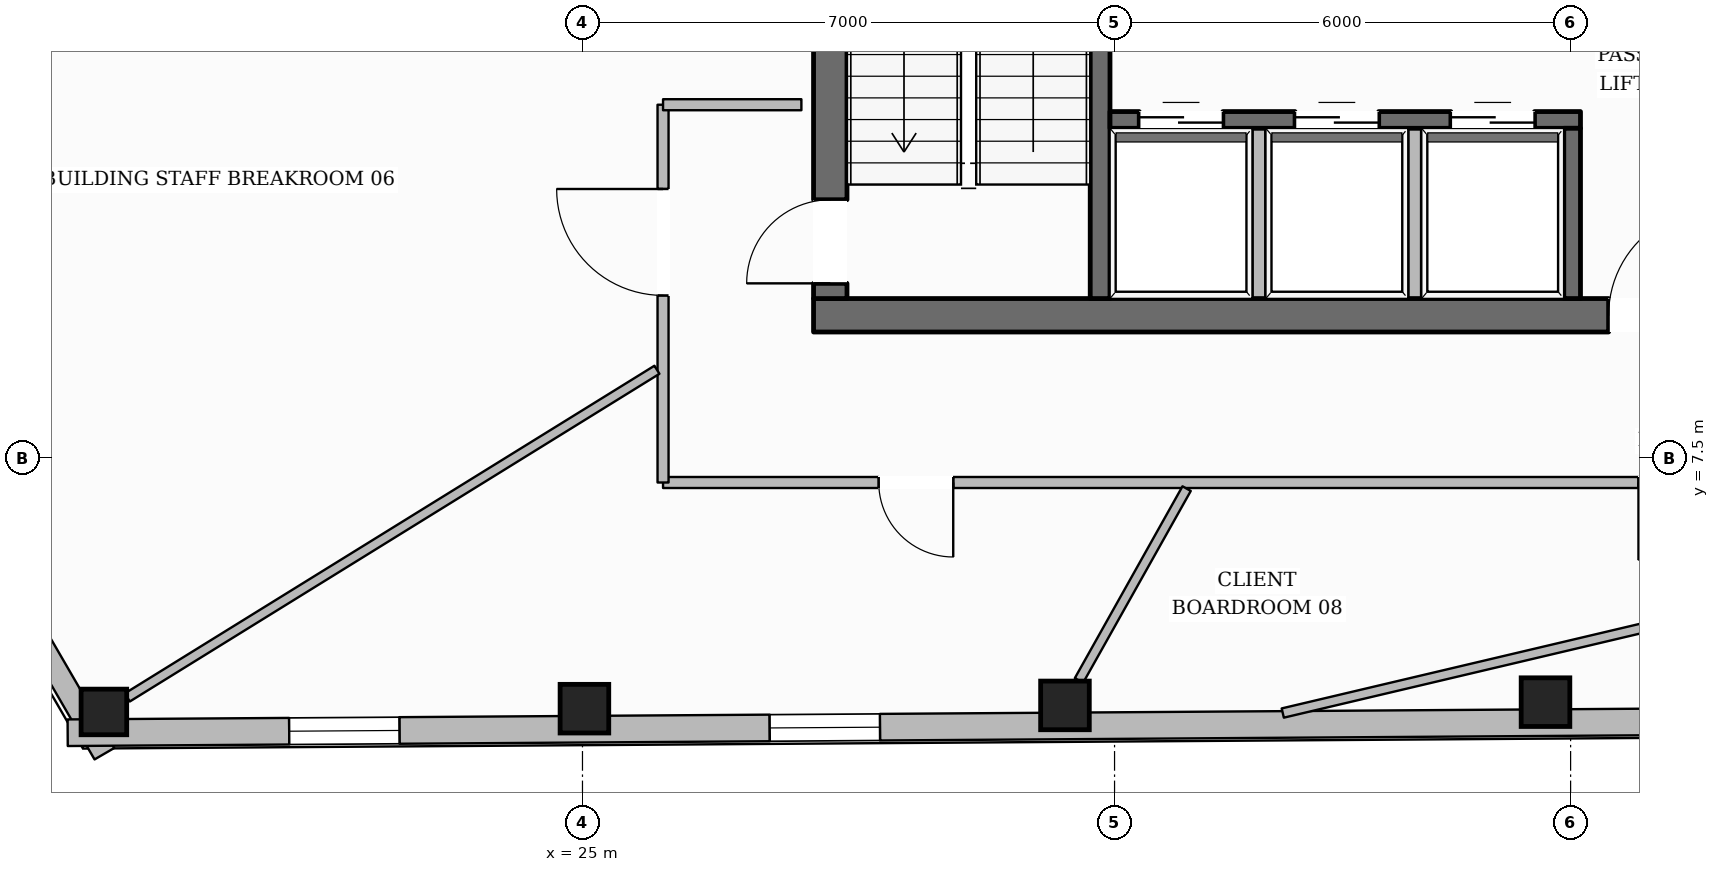
"""IFC4 building model, lengths in metres.
Left out: names, types, materials, properties, quantities, classifications, styles, units other than length and angle.
Written with IfcOpenShell. Run it as: python <this file> out.ifc"""

import sys

from ifc_helpers import new_model, si_unit, direction, frame, frame_2d, origin, origin_2d, place, context, subcontext, project, spatial, rectangle, hollow_rectangle, extrude, element, fill, save


model = new_model("IFC4")
c1 = context("Model", 3, precision=1e-05, world=origin(), true_north=direction((0.0, 1.0)))
c2 = subcontext(c1, "Body", "Model", "MODEL_VIEW")
j1 = project(units=[si_unit("LENGTHUNIT", "METRE"), si_unit("PLANEANGLEUNIT", "RADIAN")], contexts=[c1])
p1 = place(None, origin())
s1 = spatial("IfcSite", under=j1, at=p1, CompositionType="ELEMENT")
p2 = place(p1, origin())
s2 = spatial("IfcBuilding", under=s1, at=p2, CompositionType="ELEMENT")
p3 = place(p2, frame((0.0, 0.0, 211.2)))
s3 = spatial("IfcBuildingStorey", under=s2, at=p3, CompositionType="ELEMENT", Elevation=211.2)
p4 = place(p3, frame((28.04, 9.38, 0.0), z_axis=(0.0, 0.0, 1.0), x_axis=(1.0, 0.0, 0.0)))
e1 = element("IfcWall", 1, at=p4, inside=s3, PredefinedType="SOLIDWALL", context=c2, shape_type="SweptSolid", body=[
    extrude(rectangle(XDim=19.92, YDim=0.44, at=frame_2d((9.96, 0.0))), origin(), (0.0, 0.0, 1.0), 3.6),
])
p5 = place(p4, frame((10.46, 0.0, 0.0)))
e2 = element("IfcOpeningElement", 2, at=p5, cuts=e1, PredefinedType="OPENING", context=c2, shape_type="SweptSolid", body=[
    extrude(rectangle(XDim=1.4, YDim=2.2, at=frame_2d((0.7, 1.1))), frame((0.0, 0.23, 0.0), z_axis=(0.0, -1.0, 0.0), x_axis=(1.0, 0.0, 0.0)), (0.0, 0.0, 1.0), 0.46),
])
p6 = place(p3, frame((28.26, 9.6, 0.0), z_axis=(0.0, 0.0, 1.0), x_axis=(0.0, 1.0, 0.0)))
e3 = element("IfcWall", 3, at=p6, inside=s3, PredefinedType="SOLIDWALL", context=c2, shape_type="SweptSolid", body=[
    extrude(rectangle(XDim=13.0, YDim=0.44, at=frame_2d((6.5, 0.0))), origin(), (0.0, 0.0, 1.0), 3.6),
])
p7 = place(p6, frame((0.2, 0.0, 0.0)))
e4 = element("IfcOpeningElement", 4, at=p7, cuts=e3, PredefinedType="OPENING", context=c2, shape_type="SweptSolid", body=[
    extrude(rectangle(XDim=1.1, YDim=2.15, at=frame_2d((0.55, 1.075))), frame((0.0, 0.23, 0.0), z_axis=(0.0, -1.0, 0.0), x_axis=(1.0, 0.0, 0.0)), (0.0, 0.0, 1.0), 0.46),
])
p8 = place(p6, frame((8.4, 0.0, 0.0)))
e5 = element("IfcOpeningElement", 5, at=p8, cuts=e3, PredefinedType="OPENING", context=c2, shape_type="SweptSolid", body=[
    extrude(rectangle(XDim=0.9, YDim=2.1, at=frame_2d((0.45, 1.05))), frame((0.0, 0.23, 0.0), z_axis=(0.0, -1.0, 0.0), x_axis=(1.0, 0.0, 0.0)), (0.0, 0.0, 1.0), 0.46),
])
p9 = place(p3, frame((31.81, 9.6, 0.0), z_axis=(0.0, 0.0, 1.0), x_axis=(0.0, 1.0, 0.0)))
e6 = element("IfcWall", 6, at=p9, inside=s3, PredefinedType="SHEAR", context=c2, shape_type="SweptSolid", body=[
    extrude(rectangle(XDim=13.0, YDim=0.26, at=frame_2d((6.5, 0.0))), origin(), (0.0, 0.0, 1.0), 3.6),
])
p10 = place(p9, frame((10.925, 0.0, 0.0)))
e7 = element("IfcOpeningElement", 7, at=p10, cuts=e6, PredefinedType="OPENING", context=c2, shape_type="SweptSolid", body=[
    extrude(rectangle(XDim=1.25, YDim=2.25, at=frame_2d((0.625, 1.125))), frame((0.0, 0.14, 0.0), z_axis=(0.0, -1.0, 0.0), x_axis=(1.0, 0.0, 0.0)), (0.0, 0.0, 1.0), 0.28),
])
p11 = place(p3, frame((31.94, 11.95, 0.0), z_axis=(0.0, 0.0, 1.0), x_axis=(1.0, 0.0, 0.0)))
e8 = element("IfcWall", 8, at=p11, inside=s3, PredefinedType="SOLIDWALL", context=c2, shape_type="SweptSolid", body=[
    extrude(rectangle(XDim=6.19, YDim=0.22, at=frame_2d((3.095, 0.0))), origin(), (0.0, 0.0, 1.0), 3.6),
])
p12 = place(p11, frame((0.385, 0.0, 0.0)))
e9 = element("IfcOpeningElement", 9, at=p12, cuts=e8, PredefinedType="OPENING", context=c2, shape_type="SweptSolid", body=[
    extrude(rectangle(XDim=1.1, YDim=2.2, at=frame_2d((0.55, 1.1))), frame((0.0, 0.12, 0.0), z_axis=(0.0, -1.0, 0.0), x_axis=(1.0, 0.0, 0.0)), (0.0, 0.0, 1.0), 0.24),
])
p13 = place(p11, frame((2.435, 0.0, 0.0)))
e10 = element("IfcOpeningElement", 10, at=p13, cuts=e8, PredefinedType="OPENING", context=c2, shape_type="SweptSolid", body=[
    extrude(rectangle(XDim=1.1, YDim=2.2, at=frame_2d((0.55, 1.1))), frame((0.0, 0.12, 0.0), z_axis=(0.0, -1.0, 0.0), x_axis=(1.0, 0.0, 0.0)), (0.0, 0.0, 1.0), 0.24),
])
p14 = place(p11, frame((4.485, 0.0, 0.0)))
e11 = element("IfcOpeningElement", 11, at=p14, cuts=e8, PredefinedType="OPENING", context=c2, shape_type="SweptSolid", body=[
    extrude(rectangle(XDim=1.1, YDim=2.2, at=frame_2d((0.55, 1.1))), frame((0.0, 0.12, 0.0), z_axis=(0.0, -1.0, 0.0), x_axis=(1.0, 0.0, 0.0)), (0.0, 0.0, 1.0), 0.24),
])
p15 = place(p3, frame((38.02, 9.6, 0.0), z_axis=(0.0, 0.0, 1.0), x_axis=(0.0, 1.0, 0.0)))
e12 = element("IfcWall", 12, at=p15, inside=s3, PredefinedType="SOLIDWALL", context=c2, shape_type="SweptSolid", body=[
    extrude(rectangle(XDim=2.24, YDim=0.22, at=frame_2d((1.12, 0.0))), origin(), (0.0, 0.0, 1.0), 3.6),
])
p16 = place(p3, frame((18.704, 4.162, 0.0), z_axis=(0.0, 0.0, 1.0), x_axis=(1.0, 0.0, 0.0)))
e13 = element("IfcColumn", 13, at=p16, inside=s3, PredefinedType="COLUMN", context=c2, shape_type="SweptSolid", body=[
    extrude(hollow_rectangle(XDim=0.6, YDim=0.6, WallThickness=0.028, at=origin_2d()), origin(), (0.0, 0.0, 1.0), 3.6),
])
for number, where, z_axis, x_axis in (
    (14, (25.026, 4.205, 0.0), (0.0, 0.0, 1.0), (1.0, 0.0, 0.0)),
    (15, (31.348, 4.248, 0.0), (0.0, 0.0, 1.0), (1.0, 0.0, 0.0)),
    (16, (37.67, 4.29, 0.0), (0.0, 0.0, 1.0), (1.0, 0.0, 0.0)),
):
    element("IfcColumn", number, at=place(p3, frame(where, z_axis=z_axis, x_axis=x_axis)), inside=s3, PredefinedType="COLUMN", context=c2, shape_type="SweptSolid", body=[
        extrude(hollow_rectangle(XDim=0.64, YDim=0.64, WallThickness=0.028, at=origin_2d()), origin(), (0.0, 0.0, 1.0), 3.6),
    ])
p17 = place(p3, frame((14.16, 10.888, 0.0), z_axis=(0.0, 0.0, 1.0), x_axis=(0.508058913236, 0.861322321017, 0.0)))
e17 = element("IfcWall", 17, at=p17, inside=s3, PredefinedType="STANDARD", context=c2, shape_type="SweptSolid", body=[
    extrude(rectangle(XDim=38.718, YDim=0.35, at=frame_2d((19.359, 0.0))), origin(), (0.0, 0.0, 1.0), 3.132),
])
p18 = place(p17, frame((34.374, 0.0, 0.65)))
e18 = element("IfcOpeningElement", 18, at=p18, cuts=e17, PredefinedType="OPENING", context=c2, shape_type="SweptSolid", body=[
    extrude(rectangle(XDim=1.45, YDim=1.75, at=frame_2d((0.725, 0.875))), frame((0.0, 0.185, 0.0), z_axis=(0.0, -1.0, 0.0), x_axis=(1.0, 0.0, 0.0)), (0.0, 0.0, 1.0), 0.37),
])
p19 = place(p17, frame((28.08, 0.0, 0.65)))
e19 = element("IfcOpeningElement", 19, at=p19, cuts=e17, PredefinedType="OPENING", context=c2, shape_type="SweptSolid", body=[
    extrude(rectangle(XDim=1.45, YDim=1.75, at=frame_2d((0.725, 0.875))), frame((0.0, 0.185, 0.0), z_axis=(0.0, -1.0, 0.0), x_axis=(1.0, 0.0, 0.0)), (0.0, 0.0, 1.0), 0.37),
])
p20 = place(p17, frame((15.491, 0.0, 0.65)))
e20 = element("IfcOpeningElement", 20, at=p20, cuts=e17, PredefinedType="OPENING", context=c2, shape_type="SweptSolid", body=[
    extrude(rectangle(XDim=1.45, YDim=1.75, at=frame_2d((0.725, 0.875))), frame((0.0, 0.185, 0.0), z_axis=(0.0, -1.0, 0.0), x_axis=(1.0, 0.0, 0.0)), (0.0, 0.0, 1.0), 0.37),
])
p21 = place(p17, frame((9.197, 0.0, 0.65)))
e21 = element("IfcOpeningElement", 21, at=p21, cuts=e17, PredefinedType="OPENING", context=c2, shape_type="SweptSolid", body=[
    extrude(rectangle(XDim=1.45, YDim=1.75, at=frame_2d((0.725, 0.875))), frame((0.0, 0.185, 0.0), z_axis=(0.0, -1.0, 0.0), x_axis=(1.0, 0.0, 0.0)), (0.0, 0.0, 1.0), 0.37),
])
p22 = place(p17, frame((2.903, 0.0, 0.65)))
e22 = element("IfcOpeningElement", 22, at=p22, cuts=e17, PredefinedType="OPENING", context=c2, shape_type="SweptSolid", body=[
    extrude(rectangle(XDim=1.45, YDim=1.75, at=frame_2d((0.725, 0.875))), frame((0.0, 0.185, 0.0), z_axis=(0.0, -1.0, 0.0), x_axis=(1.0, 0.0, 0.0)), (0.0, 0.0, 1.0), 0.37),
])
p23 = place(p3, frame((18.71, 3.612, 0.0), z_axis=(0.0, 0.0, 1.0), x_axis=(-0.502175829977, 0.864765538043, 0.0)))
e23 = element("IfcWall", 23, at=p23, inside=s3, PredefinedType="STANDARD", context=c2, shape_type="SweptSolid", body=[
    extrude(rectangle(XDim=9.058, YDim=0.3, at=frame_2d((4.529, 0.0))), origin(), (0.0, 0.0, 1.0), 3.132),
])
p24 = place(p23, frame((4.004, 0.0, 0.65)))
e24 = element("IfcOpeningElement", 24, at=p24, cuts=e23, PredefinedType="OPENING", context=c2, shape_type="SweptSolid", body=[
    extrude(rectangle(XDim=1.05, YDim=1.7, at=frame_2d((0.525, 0.85))), frame((0.0, 0.16, 0.0), z_axis=(0.0, -1.0, 0.0), x_axis=(1.0, 0.0, 0.0)), (0.0, 0.0, 1.0), 0.32),
])
p25 = place(p3, frame((57.109, 4.153, 0.0), z_axis=(0.0, 0.0, 1.0), x_axis=(-0.999976880016, -0.006799958314, 0.0)))
e25 = element("IfcWall", 25, at=p25, inside=s3, PredefinedType="STANDARD", context=c2, shape_type="SweptSolid", body=[
    extrude(rectangle(XDim=38.883, YDim=0.35, at=frame_2d((19.442, 0.0))), origin(), (0.0, 0.0, 1.0), 3.132),
])
p26 = place(p25, frame((34.519, 0.0, 0.65)))
e26 = element("IfcOpeningElement", 26, at=p26, cuts=e25, PredefinedType="OPENING", context=c2, shape_type="SweptSolid", body=[
    extrude(rectangle(XDim=1.45, YDim=1.75, at=frame_2d((0.725, 0.875))), frame((0.0, 0.185, 0.0), z_axis=(0.0, -1.0, 0.0), x_axis=(1.0, 0.0, 0.0)), (0.0, 0.0, 1.0), 0.37),
])
p27 = place(p25, frame((28.197, 0.0, 0.65)))
e27 = element("IfcOpeningElement", 27, at=p27, cuts=e25, PredefinedType="OPENING", context=c2, shape_type="SweptSolid", body=[
    extrude(rectangle(XDim=1.45, YDim=1.75, at=frame_2d((0.725, 0.875))), frame((0.0, 0.185, 0.0), z_axis=(0.0, -1.0, 0.0), x_axis=(1.0, 0.0, 0.0)), (0.0, 0.0, 1.0), 0.37),
])
p28 = place(p25, frame((15.552, 0.0, 0.65)))
e28 = element("IfcOpeningElement", 28, at=p28, cuts=e25, PredefinedType="OPENING", context=c2, shape_type="SweptSolid", body=[
    extrude(rectangle(XDim=1.45, YDim=1.75, at=frame_2d((0.725, 0.875))), frame((0.0, 0.185, 0.0), z_axis=(0.0, -1.0, 0.0), x_axis=(1.0, 0.0, 0.0)), (0.0, 0.0, 1.0), 0.37),
])
p29 = place(p25, frame((9.23, 0.0, 0.65)))
e29 = element("IfcOpeningElement", 29, at=p29, cuts=e25, PredefinedType="OPENING", context=c2, shape_type="SweptSolid", body=[
    extrude(rectangle(XDim=1.45, YDim=1.75, at=frame_2d((0.725, 0.875))), frame((0.0, 0.185, 0.0), z_axis=(0.0, -1.0, 0.0), x_axis=(1.0, 0.0, 0.0)), (0.0, 0.0, 1.0), 0.37),
])
p30 = place(p25, frame((2.908, 0.0, 0.65)))
e30 = element("IfcOpeningElement", 30, at=p30, cuts=e25, PredefinedType="OPENING", context=c2, shape_type="SweptSolid", body=[
    extrude(rectangle(XDim=1.45, YDim=1.75, at=frame_2d((0.725, 0.875))), frame((0.0, 0.185, 0.0), z_axis=(0.0, -1.0, 0.0), x_axis=(1.0, 0.0, 0.0)), (0.0, 0.0, 1.0), 0.37),
])
for number, where, z_axis, x_axis in (
    (31, (33.9, 9.52, 0.0), (0.0, 0.0, 1.0), (0.0, 1.0, 0.0)),
    (32, (35.95, 9.52, 0.0), (0.0, 0.0, 1.0), (0.0, 1.0, 0.0)),
):
    element("IfcWall", number, at=place(p3, frame(where, z_axis=z_axis, x_axis=x_axis)), inside=s3, PredefinedType="PARTITIONING", context=c2, shape_type="SweptSolid", body=[
        extrude(rectangle(XDim=2.32, YDim=0.165, at=frame_2d((1.16, 0.0))), origin(), (0.0, 0.0, 1.0), 3.6),
    ])
p31 = place(p3, frame((49.94, 7.18, 0.0), z_axis=(0.0, 0.0, 1.0), x_axis=(-1.0, 0.0, 0.0)))
e33 = element("IfcWall", 33, at=p31, inside=s3, PredefinedType="PARTITIONING", context=c2, shape_type="SweptSolid", body=[
    extrude(rectangle(XDim=23.88, YDim=0.145, at=frame_2d((11.94, 0.0))), origin(), (0.0, 0.0, 1.0), 3.6),
])
p32 = place(p31, frame((20.062, 0.0, 0.0)))
e34 = element("IfcOpeningElement", 34, at=p32, cuts=e33, PredefinedType="OPENING", context=c2, shape_type="SweptSolid", body=[
    extrude(rectangle(XDim=0.98, YDim=2.15, at=frame_2d((0.49, 1.075))), frame((0.0, 0.083, 0.0), z_axis=(0.0, -1.0, 0.0), x_axis=(1.0, 0.0, 0.0)), (0.0, 0.0, 1.0), 0.165),
])
p33 = place(p31, frame((10.027, 0.0, 0.0)))
e35 = element("IfcOpeningElement", 35, at=p33, cuts=e33, PredefinedType="OPENING", context=c2, shape_type="SweptSolid", body=[
    extrude(rectangle(XDim=1.02, YDim=2.15, at=frame_2d((0.51, 1.075))), frame((0.0, 0.083, 0.0), z_axis=(0.0, -1.0, 0.0), x_axis=(1.0, 0.0, 0.0)), (0.0, 0.0, 1.0), 0.165),
])
p34 = place(p3, frame((26.06, 7.18, 0.0), z_axis=(0.0, 0.0, 1.0), x_axis=(0.0, 1.0, 0.0)))
e36 = element("IfcWall", 36, at=p34, inside=s3, PredefinedType="PARTITIONING", context=c2, shape_type="SweptSolid", body=[
    extrude(rectangle(XDim=4.97, YDim=0.145, at=frame_2d((2.485, 0.0))), origin(), (0.0, 0.0, 1.0), 3.6),
])
p35 = place(p34, frame((2.461, 0.0, 0.0)))
e37 = element("IfcOpeningElement", 37, at=p35, cuts=e36, PredefinedType="OPENING", context=c2, shape_type="SweptSolid", body=[
    extrude(rectangle(XDim=1.4, YDim=2.2, at=frame_2d((0.7, 1.1))), frame((0.0, 0.083, 0.0), z_axis=(0.0, -1.0, 0.0), x_axis=(1.0, 0.0, 0.0)), (0.0, 0.0, 1.0), 0.165),
])
p36 = place(p3, frame((26.06, 12.15, 0.0), z_axis=(0.0, 0.0, 1.0), x_axis=(1.0, 0.0, 0.0)))
e38 = element("IfcWall", 38, at=p36, inside=s3, PredefinedType="PARTITIONING", context=c2, shape_type="SweptSolid", body=[
    extrude(rectangle(XDim=1.82, YDim=0.145, at=frame_2d((0.91, 0.0))), origin(), (0.0, 0.0, 1.0), 3.6),
])
p37 = place(p3, frame((25.979, 8.663, 0.0), z_axis=(0.0, 0.0, 1.0), x_axis=(-0.850393393123, -0.526147390882, 0.0)))
e39 = element("IfcWall", 39, at=p37, inside=s3, PredefinedType="PARTITIONING", context=c2, shape_type="SweptSolid", body=[
    extrude(rectangle(XDim=8.194, YDim=0.125, at=frame_2d((4.097, 0.0))), origin(), (0.0, 0.0, 1.0), 3.141),
])
p38 = place(p3, frame((32.948, 7.1, 0.0), z_axis=(0.0, 0.0, 1.0), x_axis=(-0.489448120608, -0.872032417536, 0.0)))
e40 = element("IfcWall", 40, at=p38, inside=s3, PredefinedType="PARTITIONING", context=c2, shape_type="SweptSolid", body=[
    extrude(rectangle(XDim=2.895, YDim=0.125, at=frame_2d((1.447, 0.0))), origin(), (0.0, 0.0, 1.0), 3.6),
])
p39 = place(p3, frame((34.213, 4.147, 0.0), z_axis=(0.0, 0.0, 1.0), x_axis=(0.973225904265, 0.229850689075, 0.0)))
e41 = element("IfcWall", 41, at=p39, inside=s3, PredefinedType="PARTITIONING", context=c2, shape_type="SweptSolid", body=[
    extrude(rectangle(XDim=12.846, YDim=0.125, at=frame_2d((6.423, 0.0))), origin(), (0.0, 0.0, 1.0), 3.135),
])
p40 = place(p39, frame((5.984, 0.0, 0.0)))
e42 = element("IfcOpeningElement", 42, at=p40, cuts=e41, PredefinedType="OPENING", context=c2, shape_type="SweptSolid", body=[
    extrude(rectangle(XDim=0.98, YDim=2.15, at=frame_2d((0.49, 1.075))), frame((0.0, 0.073, 0.0), z_axis=(0.0, -1.0, 0.0), x_axis=(1.0, 0.0, 0.0)), (0.0, 0.0, 1.0), 0.145),
])
p41 = place(p26, origin())
e43 = element("IfcWindow", 43, at=p41, inside=s3, PartitioningType="SINGLE_PANEL", PredefinedType="WINDOW", context=c2, shape_type="SweptSolid", body=[
    extrude(rectangle(XDim=1.45, YDim=1.75, at=frame_2d((0.725, 0.875))), frame((0.0, 0.03, 0.0), z_axis=(0.0, -1.0, 0.0), x_axis=(1.0, 0.0, 0.0)), (0.0, 0.0, 1.0), 0.06),
])
fill(e26, e43)
p42 = place(p27, origin())
e44 = element("IfcWindow", 44, at=p42, inside=s3, PartitioningType="SINGLE_PANEL", PredefinedType="WINDOW", context=c2, shape_type="SweptSolid", body=[
    extrude(rectangle(XDim=1.45, YDim=1.75, at=frame_2d((0.725, 0.875))), frame((0.0, 0.03, 0.0), z_axis=(0.0, -1.0, 0.0), x_axis=(1.0, 0.0, 0.0)), (0.0, 0.0, 1.0), 0.06),
])
fill(e27, e44)
p43 = place(p7, origin())
e45 = element("IfcDoor", 45, at=p43, inside=s3, OperationType="SINGLE_SWING_LEFT", PredefinedType="DOOR", context=c2, shape_type="SweptSolid", body=[
    extrude(rectangle(XDim=1.1, YDim=2.15, at=frame_2d((0.55, 1.075))), frame((0.0, 0.025, 0.0), z_axis=(0.0, -1.0, 0.0), x_axis=(1.0, 0.0, 0.0)), (0.0, 0.0, 1.0), 0.05),
])
fill(e4, e45)
p44 = place(p5, origin())
e46 = element("IfcDoor", 46, at=p44, inside=s3, OperationType="SINGLE_SWING_RIGHT", PredefinedType="DOOR", context=c2, shape_type="SweptSolid", body=[
    extrude(rectangle(XDim=1.4, YDim=2.2, at=frame_2d((0.7, 1.1))), frame((0.0, 0.025, 0.0), z_axis=(0.0, -1.0, 0.0), x_axis=(1.0, 0.0, 0.0)), (0.0, 0.0, 1.0), 0.05),
])
fill(e2, e46)
p45 = place(p12, origin())
e47 = element("IfcDoor", 47, at=p45, inside=s3, OperationType="DOUBLE_DOOR_SLIDING", PredefinedType="DOOR", context=c2, shape_type="SweptSolid", body=[
    extrude(rectangle(XDim=1.1, YDim=2.2, at=frame_2d((0.55, 1.1))), frame((0.0, 0.025, 0.0), z_axis=(0.0, -1.0, 0.0), x_axis=(1.0, 0.0, 0.0)), (0.0, 0.0, 1.0), 0.05),
])
fill(e9, e47)
p46 = place(p13, origin())
e48 = element("IfcDoor", 48, at=p46, inside=s3, OperationType="DOUBLE_DOOR_SLIDING", PredefinedType="DOOR", context=c2, shape_type="SweptSolid", body=[
    extrude(rectangle(XDim=1.1, YDim=2.2, at=frame_2d((0.55, 1.1))), frame((0.0, 0.025, 0.0), z_axis=(0.0, -1.0, 0.0), x_axis=(1.0, 0.0, 0.0)), (0.0, 0.0, 1.0), 0.05),
])
fill(e10, e48)
p47 = place(p14, origin())
e49 = element("IfcDoor", 49, at=p47, inside=s3, OperationType="DOUBLE_DOOR_SLIDING", PredefinedType="DOOR", context=c2, shape_type="SweptSolid", body=[
    extrude(rectangle(XDim=1.1, YDim=2.2, at=frame_2d((0.55, 1.1))), frame((0.0, 0.025, 0.0), z_axis=(0.0, -1.0, 0.0), x_axis=(1.0, 0.0, 0.0)), (0.0, 0.0, 1.0), 0.05),
])
fill(e11, e49)
p48 = place(p35, origin())
e50 = element("IfcDoor", 50, at=p48, inside=s3, OperationType="SINGLE_SWING_RIGHT", PredefinedType="DOOR", context=c2, shape_type="SweptSolid", body=[
    extrude(rectangle(XDim=1.4, YDim=2.2, at=frame_2d((0.7, 1.1))), frame((0.0, 0.025, 0.0), z_axis=(0.0, -1.0, 0.0), x_axis=(1.0, 0.0, 0.0)), (0.0, 0.0, 1.0), 0.05),
])
fill(e37, e50)
p49 = place(p32, origin())
e51 = element("IfcDoor", 51, at=p49, inside=s3, OperationType="SINGLE_SWING_LEFT", PredefinedType="DOOR", context=c2, shape_type="SweptSolid", body=[
    extrude(rectangle(XDim=0.98, YDim=2.15, at=frame_2d((0.49, 1.075))), frame((0.0, 0.025, 0.0), z_axis=(0.0, -1.0, 0.0), x_axis=(1.0, 0.0, 0.0)), (0.0, 0.0, 1.0), 0.05),
])
fill(e34, e51)
p50 = place(p33, origin())
e52 = element("IfcDoor", 52, at=p50, inside=s3, OperationType="SINGLE_SWING_RIGHT", PredefinedType="DOOR", context=c2, shape_type="SweptSolid", body=[
    extrude(rectangle(XDim=1.02, YDim=2.15, at=frame_2d((0.51, 1.075))), frame((0.0, 0.025, 0.0), z_axis=(0.0, -1.0, 0.0), x_axis=(1.0, 0.0, 0.0)), (0.0, 0.0, 1.0), 0.05),
])
fill(e35, e52)
save(model, sys.argv[1])
